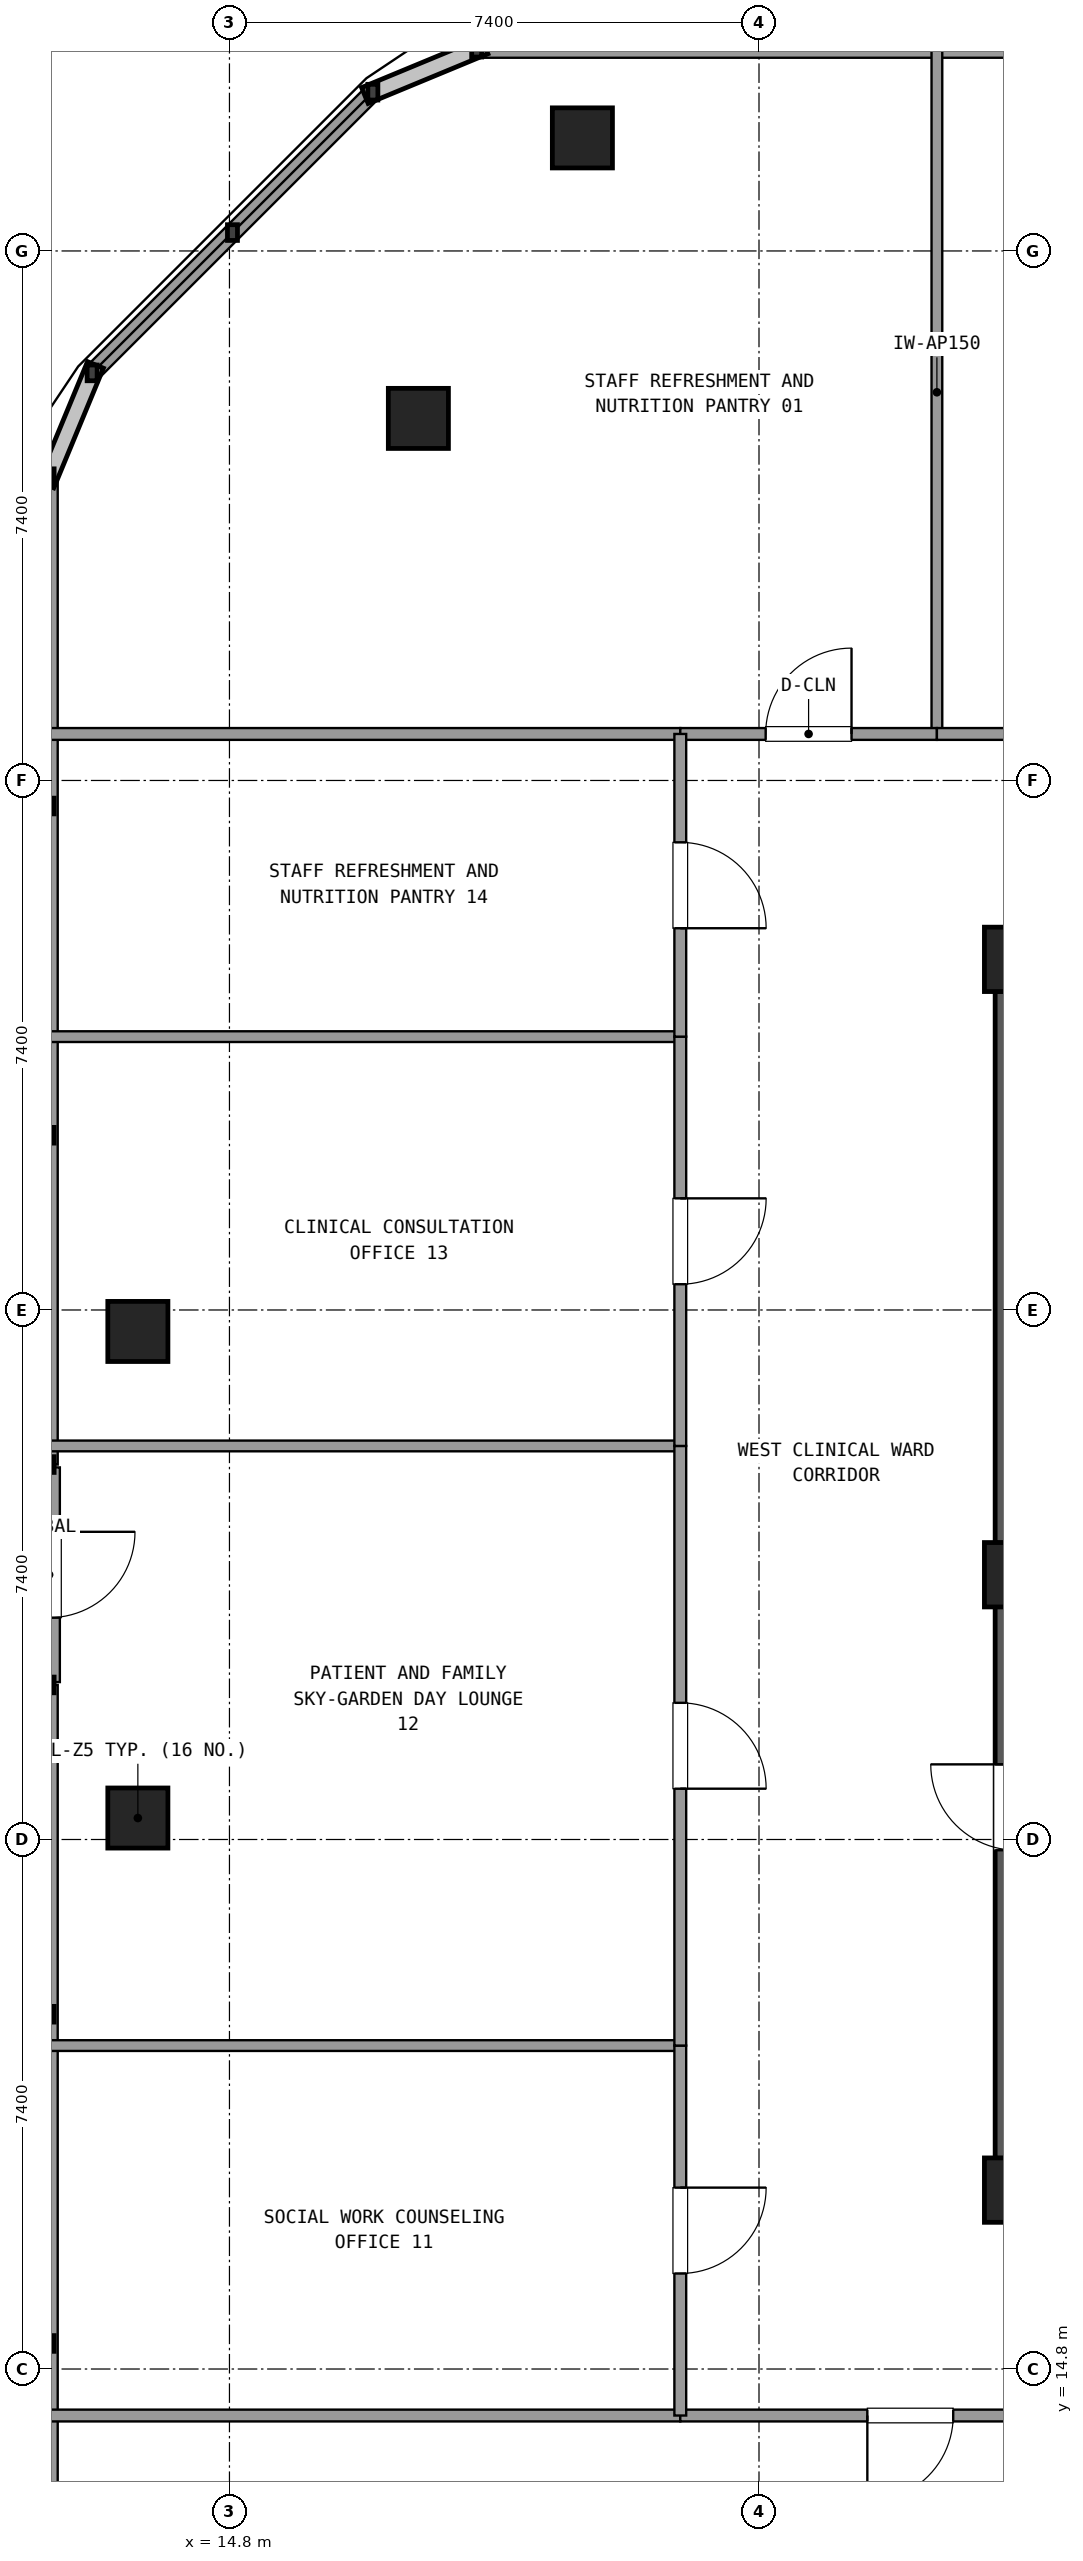
"""IFC4 building model, lengths in metres.
Left out: names, types, materials, properties, quantities, classifications, styles, units other than length and angle.
Written with IfcOpenShell. Run it as: python <this file> out.ifc"""

import sys

from ifc_helpers import new_model, si_unit, direction, frame, frame_2d, origin, origin_2d, place, context, subcontext, project, spatial, rectangle, extrude, element, fill, save


model = new_model("IFC4")
c1 = context("Model", 3, precision=1e-05, world=origin(), true_north=direction((0.0, 1.0)))
c2 = subcontext(c1, "Body", "Model", "MODEL_VIEW")
j1 = project(units=[si_unit("LENGTHUNIT", "METRE"), si_unit("PLANEANGLEUNIT", "RADIAN")], contexts=[c1])
p1 = place(None, origin())
s1 = spatial("IfcSite", under=j1, at=p1, CompositionType="ELEMENT")
p2 = place(p1, origin())
s2 = spatial("IfcBuilding", under=s1, at=p2, CompositionType="ELEMENT")
p3 = place(p2, frame((0.0, 0.0, 242.82)))
s3 = spatial("IfcBuildingStorey", under=s2, at=p3, CompositionType="ELEMENT", Elevation=242.82)
for number, where, z_axis, x_axis in (
    (1, (25.8, 17.3, 0.0), (0.0, 0.0, 1.0), (1.0, 0.0, 0.0)),
    (2, (25.8, 34.5, 0.0), (0.0, 0.0, 1.0), (1.0, 0.0, 0.0)),
    (3, (25.8, 25.9, 0.0), (0.0, 0.0, 1.0), (1.0, 0.0, 0.0)),
):
    element("IfcColumn", number, at=place(p3, frame(where, z_axis=z_axis, x_axis=x_axis)), inside=s3, PredefinedType="COLUMN", context=c2, shape_type="SweptSolid", body=[
        extrude(rectangle(XDim=0.9, YDim=0.9, at=origin_2d()), origin(), (0.0, 0.0, 1.0), 3.6),
    ])
p4 = place(p3, frame((25.8, 34.055, 0.0), z_axis=(0.0, 0.0, 1.0), x_axis=(0.0, -1.0, 0.0)))
e4 = element("IfcWall", 4, at=p4, inside=s3, PredefinedType="SHEAR", context=c2, shape_type="SweptSolid", body=[
    extrude(rectangle(XDim=7.71, YDim=0.6, at=frame_2d((3.855, 0.0))), origin(), (0.0, 0.0, 1.0), 3.32),
])
p5 = place(p3, frame((25.8, 25.455, 0.0), z_axis=(0.0, 0.0, 1.0), x_axis=(0.0, -1.0, 0.0)))
e5 = element("IfcWall", 5, at=p5, inside=s3, PredefinedType="SHEAR", context=c2, shape_type="SweptSolid", body=[
    extrude(rectangle(XDim=7.71, YDim=0.6, at=frame_2d((3.855, 0.0))), origin(), (0.0, 0.0, 1.0), 3.32),
])
p6 = place(p5, frame((2.205, 0.0, 0.0)))
e6 = element("IfcOpeningElement", 6, at=p6, cuts=e5, PredefinedType="OPENING", context=c2, shape_type="SweptSolid", body=[
    extrude(rectangle(XDim=1.2, YDim=2.15, at=frame_2d((0.6, 1.075))), frame((0.0, 0.31, 0.0), z_axis=(0.0, -1.0, 0.0), x_axis=(1.0, 0.0, 0.0)), (0.0, 0.0, 1.0), 0.62),
])
for number, where, z_axis, x_axis in (
    (7, (13.52, 22.5, 0.0), (0.0, 0.0, 1.0), (1.0, 0.0, 0.0)),
    (8, (19.732, 45.98, 0.0), (0.0, 0.0, 1.0), (1.0, 0.0, 0.0)),
    (9, (17.44, 42.06, 0.0), (0.0, 0.0, 1.0), (1.0, 0.0, 0.0)),
    (10, (13.52, 29.3, 0.0), (0.0, 0.0, 1.0), (1.0, 0.0, 0.0)),
):
    element("IfcColumn", number, at=place(p3, frame(where, z_axis=z_axis, x_axis=x_axis)), inside=s3, PredefinedType="COLUMN", context=c2, shape_type="SweptSolid", body=[
        extrude(rectangle(XDim=0.84, YDim=0.84, at=origin_2d()), origin(), (0.0, 0.0, 1.0), 3.6),
    ])
p7 = place(p3, frame((55.745, 47.22, 0.0), z_axis=(0.0, 0.0, 1.0), x_axis=(-1.0, 0.0, 0.0)))
e11 = element("IfcWall", 11, at=p7, inside=s3, PredefinedType="SOLIDWALL", context=c2, shape_type="SweptSolid", body=[
    extrude(rectangle(XDim=37.49, YDim=0.24, at=frame_2d((18.745, 0.0))), origin(), (0.0, 0.0, 1.0), 0.85),
])
p8 = place(p3, frame((16.804, 46.619, 0.0), z_axis=(0.0, 0.0, 1.0), x_axis=(-0.707106781187, -0.707106781187, 0.0)))
e12 = element("IfcWall", 12, at=p8, inside=s3, PredefinedType="SOLIDWALL", context=c2, shape_type="SweptSolid", body=[
    extrude(rectangle(XDim=5.548, YDim=0.24, at=frame_2d((2.774, 0.0))), origin(), (0.0, 0.0, 1.0), 0.85),
])
p9 = place(p3, frame((12.28, 27.4, 0.0), z_axis=(0.0, 0.0, 1.0), x_axis=(0.0, -1.0, 0.0)))
e13 = element("IfcWall", 13, at=p9, inside=s3, PredefinedType="SOLIDWALL", context=c2, shape_type="SweptSolid", body=[
    extrude(rectangle(XDim=3.0, YDim=0.3, at=frame_2d((1.5, 0.0))), origin(), (0.0, 0.0, 1.0), 2.69),
])
p10 = place(p9, frame((0.9, 0.0, 0.0)))
e14 = element("IfcOpeningElement", 14, at=p10, cuts=e13, PredefinedType="OPENING", context=c2, shape_type="SweptSolid", body=[
    extrude(rectangle(XDim=1.2, YDim=2.2, at=frame_2d((0.6, 1.1))), frame((0.0, 0.16, 0.0), z_axis=(0.0, -1.0, 0.0), x_axis=(1.0, 0.0, 0.0)), (0.0, 0.0, 1.0), 0.32),
])
for number, where, z_axis, x_axis in (
    (15, (12.28, 41.245, 0.0), (0.0, 0.0, 1.0), (0.0, -1.0, 0.0)),
    (16, (12.28, 24.36, 0.0), (0.0, 0.0, 1.0), (0.0, -1.0, 0.0)),
):
    element("IfcWall", number, at=place(p3, frame(where, z_axis=z_axis, x_axis=x_axis)), inside=s3, PredefinedType="SOLIDWALL", context=c2, shape_type="SweptSolid", body=[
        extrude(rectangle(XDim=13.805, YDim=0.24, at=frame_2d((6.903, 0.0))), origin(), (0.0, 0.0, 1.0), 0.85),
    ])
for number, where, z_axis, x_axis in (
    (17, (12.3, 37.65, 0.0), (0.0, 0.0, 1.0), (1.0, 0.0, 0.0)),
    (18, (12.3, 14.15, 0.0), (0.0, 0.0, 1.0), (1.0, 0.0, 0.0)),
):
    element("IfcWall", number, at=place(p3, frame(where, z_axis=z_axis, x_axis=x_axis)), inside=s3, PredefinedType="PARTITIONING", context=c2, shape_type="SweptSolid", body=[
        extrude(rectangle(XDim=8.8, YDim=0.165, at=frame_2d((4.4, 0.0))), origin(), (0.0, 0.0, 1.0), 2.61),
    ])
p11 = place(p3, frame((24.686, 37.65, 0.0), z_axis=(0.0, 0.0, 1.0), x_axis=(0.0, 1.0, 0.0)))
e19 = element("IfcWall", 19, at=p11, inside=s3, PredefinedType="PARTITIONING", context=c2, shape_type="SweptSolid", body=[
    extrude(rectangle(XDim=9.55, YDim=0.15, at=frame_2d((4.775, 0.0))), origin(), (0.0, 0.0, 1.0), 2.61),
])
p12 = place(p3, frame((21.1, 37.65, 0.0), z_axis=(0.0, 0.0, 1.0), x_axis=(1.0, 0.0, 0.0)))
e20 = element("IfcWall", 20, at=p12, inside=s3, PredefinedType="PARTITIONING", context=c2, shape_type="SweptSolid", body=[
    extrude(rectangle(XDim=3.586, YDim=0.165, at=frame_2d((1.793, 0.0))), origin(), (0.0, 0.0, 1.0), 2.61),
])
p13 = place(p12, frame((1.193, 0.0, 0.0)))
e21 = element("IfcOpeningElement", 21, at=p13, cuts=e20, PredefinedType="OPENING", context=c2, shape_type="SweptSolid", body=[
    extrude(rectangle(XDim=1.2, YDim=2.15, at=frame_2d((0.6, 1.075))), frame((0.0, 0.093, 0.0), z_axis=(0.0, -1.0, 0.0), x_axis=(1.0, 0.0, 0.0)), (0.0, 0.0, 1.0), 0.185),
])
p14 = place(p3, frame((24.686, 37.65, 0.0), z_axis=(0.0, 0.0, 1.0), x_axis=(1.0, 0.0, 0.0)))
e22 = element("IfcWall", 22, at=p14, inside=s3, PredefinedType="PARTITIONING", context=c2, shape_type="SweptSolid", body=[
    extrude(rectangle(XDim=8.999, YDim=0.165, at=frame_2d((4.5, 0.0))), origin(), (0.0, 0.0, 1.0), 2.61),
])
p15 = place(p14, frame((3.9, 0.0, 0.0)))
e23 = element("IfcOpeningElement", 23, at=p15, cuts=e22, PredefinedType="OPENING", context=c2, shape_type="SweptSolid", body=[
    extrude(rectangle(XDim=1.2, YDim=2.15, at=frame_2d((0.6, 1.075))), frame((0.0, 0.093, 0.0), z_axis=(0.0, -1.0, 0.0), x_axis=(1.0, 0.0, 0.0)), (0.0, 0.0, 1.0), 0.185),
])
p16 = place(p3, frame((21.1, 14.15, 0.0), z_axis=(0.0, 0.0, 1.0), x_axis=(1.0, 0.0, 0.0)))
e24 = element("IfcWall", 24, at=p16, inside=s3, PredefinedType="PARTITIONING", context=c2, shape_type="SweptSolid", body=[
    extrude(rectangle(XDim=6.428, YDim=0.165, at=frame_2d((3.214, 0.0))), origin(), (0.0, 0.0, 1.0), 2.61),
])
p17 = place(p16, frame((2.614, 0.0, 0.0)))
e25 = element("IfcOpeningElement", 25, at=p17, cuts=e24, PredefinedType="OPENING", context=c2, shape_type="SweptSolid", body=[
    extrude(rectangle(XDim=1.2, YDim=2.15, at=frame_2d((0.6, 1.075))), frame((0.0, 0.093, 0.0), z_axis=(0.0, -1.0, 0.0), x_axis=(1.0, 0.0, 0.0)), (0.0, 0.0, 1.0), 0.185),
])
p18 = place(p3, frame((21.1, 19.32, 0.0), z_axis=(0.0, 0.0, 1.0), x_axis=(-1.0, 0.0, 0.0)))
e26 = element("IfcWall", 26, at=p18, inside=s3, PredefinedType="PARTITIONING", context=c2, shape_type="SweptSolid", body=[
    extrude(rectangle(XDim=8.8, YDim=0.15, at=frame_2d((4.4, 0.0))), origin(), (0.0, 0.0, 1.0), 2.61),
])
p19 = place(p3, frame((21.1, 14.15, 0.0), z_axis=(0.0, 0.0, 1.0), x_axis=(0.0, 1.0, 0.0)))
e27 = element("IfcWall", 27, at=p19, inside=s3, PredefinedType="PARTITIONING", context=c2, shape_type="SweptSolid", body=[
    extrude(rectangle(XDim=5.17, YDim=0.165, at=frame_2d((2.585, 0.0))), origin(), (0.0, 0.0, 1.0), 2.61),
])
p20 = place(p19, frame((1.985, 0.0, 0.0)))
e28 = element("IfcOpeningElement", 28, at=p20, cuts=e27, PredefinedType="OPENING", context=c2, shape_type="SweptSolid", body=[
    extrude(rectangle(XDim=1.2, YDim=2.15, at=frame_2d((0.6, 1.075))), frame((0.0, 0.093, 0.0), z_axis=(0.0, -1.0, 0.0), x_axis=(1.0, 0.0, 0.0)), (0.0, 0.0, 1.0), 0.185),
])
p21 = place(p3, frame((21.1, 27.7, 0.0), z_axis=(0.0, 0.0, 1.0), x_axis=(-1.0, 0.0, 0.0)))
e29 = element("IfcWall", 29, at=p21, inside=s3, PredefinedType="PARTITIONING", context=c2, shape_type="SweptSolid", body=[
    extrude(rectangle(XDim=8.8, YDim=0.15, at=frame_2d((4.4, 0.0))), origin(), (0.0, 0.0, 1.0), 2.61),
])
p22 = place(p3, frame((21.1, 19.32, 0.0), z_axis=(0.0, 0.0, 1.0), x_axis=(0.0, 1.0, 0.0)))
e30 = element("IfcWall", 30, at=p22, inside=s3, PredefinedType="PARTITIONING", context=c2, shape_type="SweptSolid", body=[
    extrude(rectangle(XDim=8.38, YDim=0.165, at=frame_2d((4.19, 0.0))), origin(), (0.0, 0.0, 1.0), 2.61),
])
p23 = place(p22, frame((3.59, 0.0, 0.0)))
e31 = element("IfcOpeningElement", 31, at=p23, cuts=e30, PredefinedType="OPENING", context=c2, shape_type="SweptSolid", body=[
    extrude(rectangle(XDim=1.2, YDim=2.15, at=frame_2d((0.6, 1.075))), frame((0.0, 0.093, 0.0), z_axis=(0.0, -1.0, 0.0), x_axis=(1.0, 0.0, 0.0)), (0.0, 0.0, 1.0), 0.185),
])
p24 = place(p3, frame((21.1, 33.42, 0.0), z_axis=(0.0, 0.0, 1.0), x_axis=(-1.0, 0.0, 0.0)))
e32 = element("IfcWall", 32, at=p24, inside=s3, PredefinedType="PARTITIONING", context=c2, shape_type="SweptSolid", body=[
    extrude(rectangle(XDim=8.8, YDim=0.15, at=frame_2d((4.4, 0.0))), origin(), (0.0, 0.0, 1.0), 2.61),
])
p25 = place(p3, frame((21.1, 27.7, 0.0), z_axis=(0.0, 0.0, 1.0), x_axis=(0.0, 1.0, 0.0)))
e33 = element("IfcWall", 33, at=p25, inside=s3, PredefinedType="PARTITIONING", context=c2, shape_type="SweptSolid", body=[
    extrude(rectangle(XDim=5.72, YDim=0.165, at=frame_2d((2.86, 0.0))), origin(), (0.0, 0.0, 1.0), 2.61),
])
p26 = place(p25, frame((2.26, 0.0, 0.0)))
e34 = element("IfcOpeningElement", 34, at=p26, cuts=e33, PredefinedType="OPENING", context=c2, shape_type="SweptSolid", body=[
    extrude(rectangle(XDim=1.2, YDim=2.15, at=frame_2d((0.6, 1.075))), frame((0.0, 0.093, 0.0), z_axis=(0.0, -1.0, 0.0), x_axis=(1.0, 0.0, 0.0)), (0.0, 0.0, 1.0), 0.185),
])
p27 = place(p3, frame((21.1, 33.42, 0.0), z_axis=(0.0, 0.0, 1.0), x_axis=(0.0, 1.0, 0.0)))
e35 = element("IfcWall", 35, at=p27, inside=s3, PredefinedType="PARTITIONING", context=c2, shape_type="SweptSolid", body=[
    extrude(rectangle(XDim=4.23, YDim=0.165, at=frame_2d((2.115, 0.0))), origin(), (0.0, 0.0, 1.0), 2.61),
])
p28 = place(p27, frame((1.515, 0.0, 0.0)))
e36 = element("IfcOpeningElement", 36, at=p28, cuts=e35, PredefinedType="OPENING", context=c2, shape_type="SweptSolid", body=[
    extrude(rectangle(XDim=1.2, YDim=2.15, at=frame_2d((0.6, 1.075))), frame((0.0, 0.093, 0.0), z_axis=(0.0, -1.0, 0.0), x_axis=(1.0, 0.0, 0.0)), (0.0, 0.0, 1.0), 0.185),
])
p29 = place(p13, origin())
e37 = element("IfcDoor", 37, at=p29, inside=s3, OperationType="SINGLE_SWING_RIGHT", PredefinedType="DOOR", context=c2, shape_type="SweptSolid", body=[
    extrude(rectangle(XDim=1.2, YDim=2.15, at=frame_2d((0.6, 1.075))), frame((0.0, 0.025, 0.0), z_axis=(0.0, -1.0, 0.0), x_axis=(1.0, 0.0, 0.0)), (0.0, 0.0, 1.0), 0.05),
])
fill(e21, e37)
p30 = place(p17, frame((1.2, 0.0, 0.0), z_axis=(0.0, 0.0, 1.0), x_axis=(-1.0, 0.0, 0.0)))
e38 = element("IfcDoor", 38, at=p30, inside=s3, OperationType="SINGLE_SWING_LEFT", PredefinedType="DOOR", context=c2, shape_type="SweptSolid", body=[
    extrude(rectangle(XDim=1.2, YDim=2.15, at=frame_2d((0.6, 1.075))), frame((0.0, 0.025, 0.0), z_axis=(0.0, -1.0, 0.0), x_axis=(1.0, 0.0, 0.0)), (0.0, 0.0, 1.0), 0.05),
])
fill(e25, e38)
p31 = place(p20, frame((1.2, 0.0, 0.0), z_axis=(0.0, 0.0, 1.0), x_axis=(-1.0, 0.0, 0.0)))
e39 = element("IfcDoor", 39, at=p31, inside=s3, OperationType="SINGLE_SWING_RIGHT", PredefinedType="DOOR", context=c2, shape_type="SweptSolid", body=[
    extrude(rectangle(XDim=1.2, YDim=2.15, at=frame_2d((0.6, 1.075))), frame((0.0, 0.025, 0.0), z_axis=(0.0, -1.0, 0.0), x_axis=(1.0, 0.0, 0.0)), (0.0, 0.0, 1.0), 0.05),
])
fill(e28, e39)
p32 = place(p23, frame((1.2, 0.0, 0.0), z_axis=(0.0, 0.0, 1.0), x_axis=(-1.0, 0.0, 0.0)))
e40 = element("IfcDoor", 40, at=p32, inside=s3, OperationType="SINGLE_SWING_LEFT", PredefinedType="DOOR", context=c2, shape_type="SweptSolid", body=[
    extrude(rectangle(XDim=1.2, YDim=2.15, at=frame_2d((0.6, 1.075))), frame((0.0, 0.025, 0.0), z_axis=(0.0, -1.0, 0.0), x_axis=(1.0, 0.0, 0.0)), (0.0, 0.0, 1.0), 0.05),
])
fill(e31, e40)
p33 = place(p26, frame((1.2, 0.0, 0.0), z_axis=(0.0, 0.0, 1.0), x_axis=(-1.0, 0.0, 0.0)))
e41 = element("IfcDoor", 41, at=p33, inside=s3, OperationType="SINGLE_SWING_RIGHT", PredefinedType="DOOR", context=c2, shape_type="SweptSolid", body=[
    extrude(rectangle(XDim=1.2, YDim=2.15, at=frame_2d((0.6, 1.075))), frame((0.0, 0.025, 0.0), z_axis=(0.0, -1.0, 0.0), x_axis=(1.0, 0.0, 0.0)), (0.0, 0.0, 1.0), 0.05),
])
fill(e34, e41)
p34 = place(p28, frame((1.2, 0.0, 0.0), z_axis=(0.0, 0.0, 1.0), x_axis=(-1.0, 0.0, 0.0)))
e42 = element("IfcDoor", 42, at=p34, inside=s3, OperationType="SINGLE_SWING_LEFT", PredefinedType="DOOR", context=c2, shape_type="SweptSolid", body=[
    extrude(rectangle(XDim=1.2, YDim=2.15, at=frame_2d((0.6, 1.075))), frame((0.0, 0.025, 0.0), z_axis=(0.0, -1.0, 0.0), x_axis=(1.0, 0.0, 0.0)), (0.0, 0.0, 1.0), 0.05),
])
fill(e36, e42)
save(model, sys.argv[1])
